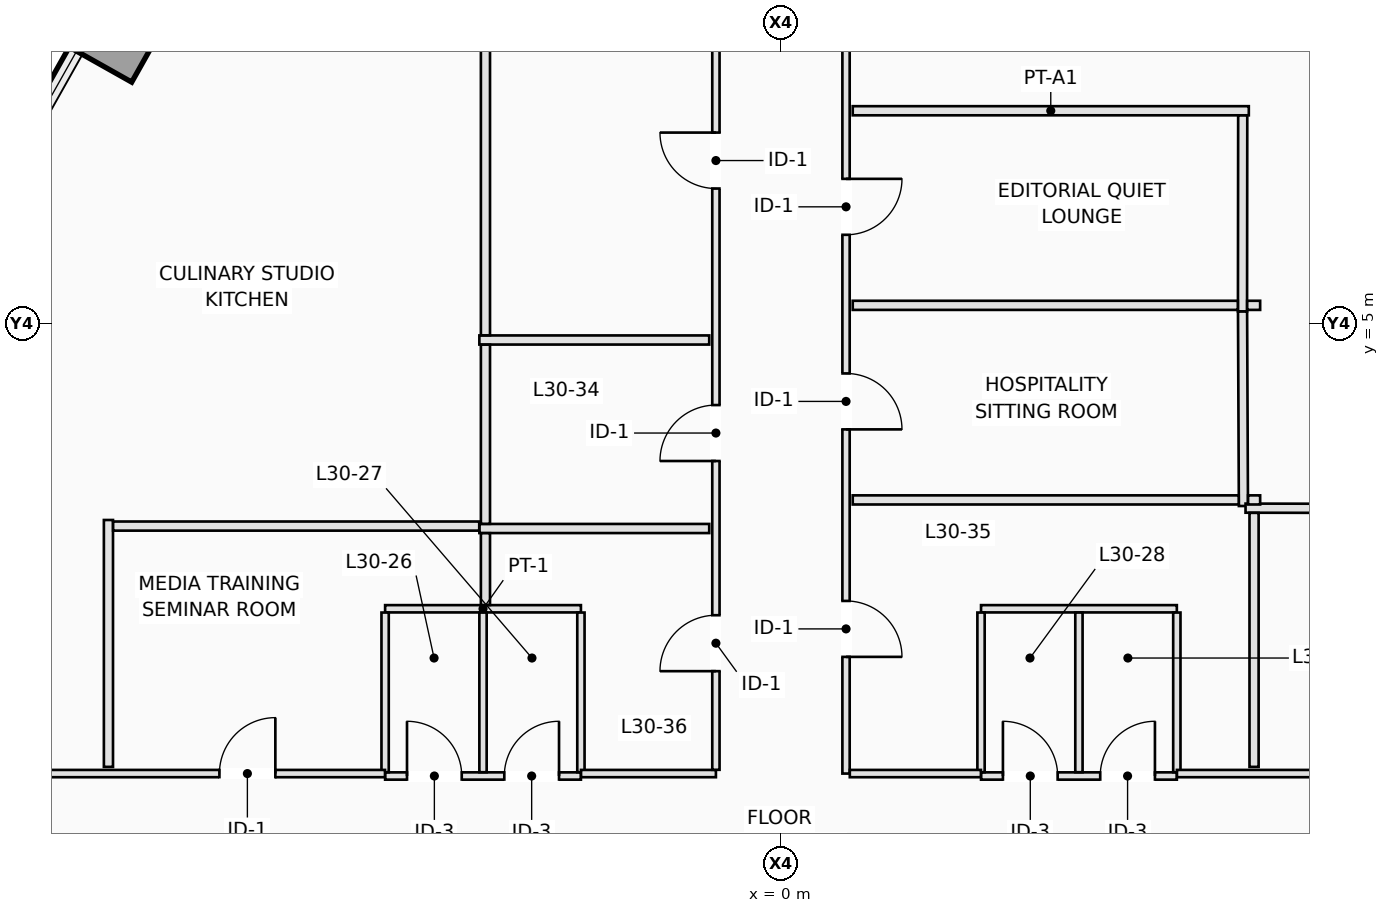
"""IFC4 building model, lengths in metres.
Left out: names, types, materials, properties, quantities, classifications, styles, units other than length and angle.
Written with IfcOpenShell. Run it as: python <this file> out.ifc"""

import sys

from ifc_helpers import new_model, si_unit, direction, frame, frame_2d, origin, origin_2d, place, context, subcontext, project, spatial, rectangle, extrude, element, fill, save


model = new_model("IFC4")
c1 = context("Model", 3, precision=1e-05, world=origin(), true_north=direction((0.0, 1.0)))
c2 = subcontext(c1, "Body", "Model", "MODEL_VIEW")
j1 = project(units=[si_unit("LENGTHUNIT", "METRE"), si_unit("PLANEANGLEUNIT", "RADIAN")], contexts=[c1])
p1 = place(None, origin())
s1 = spatial("IfcSite", under=j1, at=p1, CompositionType="ELEMENT")
p2 = place(p1, origin())
s2 = spatial("IfcBuilding", under=s1, at=p2, CompositionType="ELEMENT")
p3 = place(p2, frame((0.0, 0.0, 112.5)))
s3 = spatial("IfcBuildingStorey", under=s2, at=p3, CompositionType="ELEMENT", Elevation=112.5)
p4 = place(p3, frame((-10.887, 9.72, 0.0), z_axis=(0.0, 0.0, 1.0), x_axis=(-0.871575139605, 0.490261946333, 0.0)))
e1 = element("IfcColumn", 1, at=p4, inside=s3, PredefinedType="COLUMN", context=c2, shape_type="SweptSolid", body=[
    extrude(rectangle(XDim=1.1, YDim=1.1, at=origin_2d()), origin(), (0.0, 0.0, 1.0), 3.5),
])
p5 = place(p3, frame((-6.51, -2.44, 0.0), z_axis=(0.0, 0.0, 1.0), x_axis=(1.0, 0.0, 0.0)))
e2 = element("IfcWall", 2, at=p5, inside=s3, PredefinedType="PARTITIONING", context=c2, shape_type="SweptSolid", body=[
    extrude(rectangle(XDim=3.22, YDim=0.12, at=frame_2d((1.61, 0.0))), origin(), (0.0, 0.0, 1.0), 3.25),
])
p6 = place(p5, frame((0.36, 0.0, 0.0)))
e3 = element("IfcOpeningElement", 3, at=p6, cuts=e2, PredefinedType="OPENING", context=c2, shape_type="SweptSolid", body=[
    extrude(rectangle(XDim=0.9, YDim=2.12, at=frame_2d((0.45, 1.06))), frame((0.0, 0.07, 0.0), z_axis=(0.0, -1.0, 0.0), x_axis=(1.0, 0.0, 0.0)), (0.0, 0.0, 1.0), 0.14),
])
p7 = place(p5, frame((1.96, 0.0, 0.0)))
e4 = element("IfcOpeningElement", 4, at=p7, cuts=e2, PredefinedType="OPENING", context=c2, shape_type="SweptSolid", body=[
    extrude(rectangle(XDim=0.9, YDim=2.12, at=frame_2d((0.45, 1.06))), frame((0.0, 0.07, 0.0), z_axis=(0.0, -1.0, 0.0), x_axis=(1.0, 0.0, 0.0)), (0.0, 0.0, 1.0), 0.14),
])
p8 = place(p3, frame((-6.51, 0.31, 0.0), z_axis=(0.0, 0.0, 1.0), x_axis=(1.0, 0.0, 0.0)))
e5 = element("IfcWall", 5, at=p8, inside=s3, PredefinedType="PARTITIONING", context=c2, shape_type="SweptSolid", body=[
    extrude(rectangle(XDim=3.22, YDim=0.12, at=frame_2d((1.61, 0.0))), origin(), (0.0, 0.0, 1.0), 2.891),
])
for number, where, z_axis, x_axis in (
    (6, (-6.51, -2.378, 0.0), (0.0, 0.0, 1.0), (0.0, 1.0, 0.0)),
    (7, (-4.9, -2.378, 0.0), (0.0, 0.0, 1.0), (0.0, 1.0, 0.0)),
    (8, (-3.29, -2.378, 0.0), (0.0, 0.0, 1.0), (0.0, 1.0, 0.0)),
):
    element("IfcWall", number, at=place(p3, frame(where, z_axis=z_axis, x_axis=x_axis)), inside=s3, PredefinedType="PARTITIONING", context=c2, shape_type="SweptSolid", body=[
        extrude(rectangle(XDim=2.626, YDim=0.12, at=frame_2d((1.313, 0.0))), origin(), (0.0, 0.0, 1.0), 3.25),
    ])
p9 = place(p3, frame((3.29, -2.44, 0.0), z_axis=(0.0, 0.0, 1.0), x_axis=(1.0, 0.0, 0.0)))
e9 = element("IfcWall", 9, at=p9, inside=s3, PredefinedType="PARTITIONING", context=c2, shape_type="SweptSolid", body=[
    extrude(rectangle(XDim=3.22, YDim=0.12, at=frame_2d((1.61, 0.0))), origin(), (0.0, 0.0, 1.0), 3.25),
])
p10 = place(p9, frame((0.36, 0.0, 0.0)))
e10 = element("IfcOpeningElement", 10, at=p10, cuts=e9, PredefinedType="OPENING", context=c2, shape_type="SweptSolid", body=[
    extrude(rectangle(XDim=0.9, YDim=2.12, at=frame_2d((0.45, 1.06))), frame((0.0, 0.07, 0.0), z_axis=(0.0, -1.0, 0.0), x_axis=(1.0, 0.0, 0.0)), (0.0, 0.0, 1.0), 0.14),
])
p11 = place(p9, frame((1.96, 0.0, 0.0)))
e11 = element("IfcOpeningElement", 11, at=p11, cuts=e9, PredefinedType="OPENING", context=c2, shape_type="SweptSolid", body=[
    extrude(rectangle(XDim=0.9, YDim=2.12, at=frame_2d((0.45, 1.06))), frame((0.0, 0.07, 0.0), z_axis=(0.0, -1.0, 0.0), x_axis=(1.0, 0.0, 0.0)), (0.0, 0.0, 1.0), 0.14),
])
p12 = place(p3, frame((3.29, 0.31, 0.0), z_axis=(0.0, 0.0, 1.0), x_axis=(1.0, 0.0, 0.0)))
e12 = element("IfcWall", 12, at=p12, inside=s3, PredefinedType="PARTITIONING", context=c2, shape_type="SweptSolid", body=[
    extrude(rectangle(XDim=3.22, YDim=0.12, at=frame_2d((1.61, 0.0))), origin(), (0.0, 0.0, 1.0), 2.891),
])
for number, where, z_axis, x_axis in (
    (13, (3.29, -2.378, 0.0), (0.0, 0.0, 1.0), (0.0, 1.0, 0.0)),
    (14, (4.9, -2.378, 0.0), (0.0, 0.0, 1.0), (0.0, 1.0, 0.0)),
    (15, (6.51, -2.378, 0.0), (0.0, 0.0, 1.0), (0.0, 1.0, 0.0)),
):
    element("IfcWall", number, at=place(p3, frame(where, z_axis=z_axis, x_axis=x_axis)), inside=s3, PredefinedType="PARTITIONING", context=c2, shape_type="SweptSolid", body=[
        extrude(rectangle(XDim=2.626, YDim=0.12, at=frame_2d((1.313, 0.0))), origin(), (0.0, 0.0, 1.0), 3.25),
    ])
p13 = place(p3, frame((-12.348, -2.4, 0.0), z_axis=(0.0, 0.0, 1.0), x_axis=(1.0, 0.0, 0.0)))
e16 = element("IfcWall", 16, at=p13, inside=s3, PredefinedType="PARTITIONING", context=c2, shape_type="SweptSolid", body=[
    extrude(rectangle(XDim=5.836, YDim=0.12, at=frame_2d((2.918, 0.0))), origin(), (0.0, 0.0, 1.0), 3.25),
])
p14 = place(p13, frame((3.113, 0.0, 0.0)))
e17 = element("IfcOpeningElement", 17, at=p14, cuts=e16, PredefinedType="OPENING", context=c2, shape_type="SweptSolid", body=[
    extrude(rectangle(XDim=0.92, YDim=2.12, at=frame_2d((0.46, 1.06))), frame((0.0, 0.07, 0.0), z_axis=(0.0, -1.0, 0.0), x_axis=(1.0, 0.0, 0.0)), (0.0, 0.0, 1.0), 0.14),
])
p15 = place(p3, frame((-3.288, -2.4, 0.0), z_axis=(0.0, 0.0, 1.0), x_axis=(1.0, 0.0, 0.0)))
e18 = element("IfcWall", 18, at=p15, inside=s3, PredefinedType="PARTITIONING", context=c2, shape_type="SweptSolid", body=[
    extrude(rectangle(XDim=2.218, YDim=0.12, at=frame_2d((1.109, 0.0))), origin(), (0.0, 0.0, 1.0), 3.25),
])
p16 = place(p3, frame((-1.07, -2.338, 0.0), z_axis=(0.0, 0.0, 1.0), x_axis=(0.0, 1.0, 0.0)))
e19 = element("IfcWall", 19, at=p16, inside=s3, PredefinedType="PARTITIONING", context=c2, shape_type="SweptSolid", body=[
    extrude(rectangle(XDim=13.188, YDim=0.12, at=frame_2d((6.594, 0.0))), origin(), (0.0, 0.0, 1.0), 3.25),
])
p17 = place(p16, frame((9.559, 0.0, 0.0)))
e20 = element("IfcOpeningElement", 20, at=p17, cuts=e19, PredefinedType="OPENING", context=c2, shape_type="SweptSolid", body=[
    extrude(rectangle(XDim=0.92, YDim=2.12, at=frame_2d((0.46, 1.06))), frame((0.0, 0.07, 0.0), z_axis=(0.0, -1.0, 0.0), x_axis=(1.0, 0.0, 0.0)), (0.0, 0.0, 1.0), 0.14),
])
p18 = place(p16, frame((5.078, 0.0, 0.0)))
e21 = element("IfcOpeningElement", 21, at=p18, cuts=e19, PredefinedType="OPENING", context=c2, shape_type="SweptSolid", body=[
    extrude(rectangle(XDim=0.92, YDim=2.12, at=frame_2d((0.46, 1.06))), frame((0.0, 0.07, 0.0), z_axis=(0.0, -1.0, 0.0), x_axis=(1.0, 0.0, 0.0)), (0.0, 0.0, 1.0), 0.14),
])
p19 = place(p16, frame((1.622, 0.0, 0.0)))
e22 = element("IfcOpeningElement", 22, at=p19, cuts=e19, PredefinedType="OPENING", context=c2, shape_type="SweptSolid", body=[
    extrude(rectangle(XDim=0.92, YDim=2.12, at=frame_2d((0.46, 1.06))), frame((0.0, 0.07, 0.0), z_axis=(0.0, -1.0, 0.0), x_axis=(1.0, 0.0, 0.0)), (0.0, 0.0, 1.0), 0.14),
])
p20 = place(p3, frame((1.07, 10.788, 0.0), z_axis=(0.0, 0.0, 1.0), x_axis=(0.0, -1.0, 0.0)))
e23 = element("IfcWall", 23, at=p20, inside=s3, PredefinedType="PARTITIONING", context=c2, shape_type="SweptSolid", body=[
    extrude(rectangle(XDim=13.188, YDim=0.12, at=frame_2d((6.594, 0.0))), origin(), (0.0, 0.0, 1.0), 3.25),
])
p21 = place(p20, frame((3.408, 0.0, 0.0)))
e24 = element("IfcOpeningElement", 24, at=p21, cuts=e23, PredefinedType="OPENING", context=c2, shape_type="SweptSolid", body=[
    extrude(rectangle(XDim=0.92, YDim=2.12, at=frame_2d((0.46, 1.06))), frame((0.0, 0.07, 0.0), z_axis=(0.0, -1.0, 0.0), x_axis=(1.0, 0.0, 0.0)), (0.0, 0.0, 1.0), 0.14),
])
p22 = place(p20, frame((6.608, 0.0, 0.0)))
e25 = element("IfcOpeningElement", 25, at=p22, cuts=e23, PredefinedType="OPENING", context=c2, shape_type="SweptSolid", body=[
    extrude(rectangle(XDim=0.92, YDim=2.12, at=frame_2d((0.46, 1.06))), frame((0.0, 0.07, 0.0), z_axis=(0.0, -1.0, 0.0), x_axis=(1.0, 0.0, 0.0)), (0.0, 0.0, 1.0), 0.14),
])
p23 = place(p20, frame((10.349, 0.0, 0.0)))
e26 = element("IfcOpeningElement", 26, at=p23, cuts=e23, PredefinedType="OPENING", context=c2, shape_type="SweptSolid", body=[
    extrude(rectangle(XDim=0.92, YDim=2.12, at=frame_2d((0.46, 1.06))), frame((0.0, 0.07, 0.0), z_axis=(0.0, -1.0, 0.0), x_axis=(1.0, 0.0, 0.0)), (0.0, 0.0, 1.0), 0.14),
])
p24 = place(p3, frame((1.132, -2.4, 0.0), z_axis=(0.0, 0.0, 1.0), x_axis=(1.0, 0.0, 0.0)))
e27 = element("IfcWall", 27, at=p24, inside=s3, PredefinedType="PARTITIONING", context=c2, shape_type="SweptSolid", body=[
    extrude(rectangle(XDim=2.156, YDim=0.12, at=frame_2d((1.078, 0.0))), origin(), (0.0, 0.0, 1.0), 3.25),
])
p25 = place(p3, frame((6.512, -2.4, 0.0), z_axis=(0.0, 0.0, 1.0), x_axis=(1.0, 0.0, 0.0)))
e28 = element("IfcWall", 28, at=p25, inside=s3, PredefinedType="PARTITIONING", context=c2, shape_type="SweptSolid", body=[
    extrude(rectangle(XDim=5.898, YDim=0.12, at=frame_2d((2.949, 0.0))), origin(), (0.0, 0.0, 1.0), 3.25),
])
p26 = place(p25, frame((2.994, 0.0, 0.0)))
e29 = element("IfcOpeningElement", 29, at=p26, cuts=e28, PredefinedType="OPENING", context=c2, shape_type="SweptSolid", body=[
    extrude(rectangle(XDim=0.92, YDim=2.12, at=frame_2d((0.46, 1.06))), frame((0.0, 0.07, 0.0), z_axis=(0.0, -1.0, 0.0), x_axis=(1.0, 0.0, 0.0)), (0.0, 0.0, 1.0), 0.14),
])
p27 = place(p3, frame((7.694, 8.5, 0.0), z_axis=(0.0, 0.0, 1.0), x_axis=(-1.0, 0.0, 0.0)))
e30 = element("IfcWall", 30, at=p27, inside=s3, PredefinedType="PARTITIONING", context=c2, shape_type="SweptSolid", body=[
    extrude(rectangle(XDim=6.514, YDim=0.15, at=frame_2d((3.257, 0.0))), origin(), (0.0, 0.0, 1.0), 3.25),
])
p28 = place(p3, frame((7.59, 5.2, 0.0), z_axis=(0.0, 0.0, 1.0), x_axis=(0.001136190753, 0.999999354535, 0.0)))
e31 = element("IfcWall", 31, at=p28, inside=s3, PredefinedType="PARTITIONING", context=c2, shape_type="SweptSolid", body=[
    extrude(rectangle(XDim=3.223, YDim=0.15, at=frame_2d((1.612, 0.0))), origin(), (0.0, 0.0, 1.0), 3.25),
])
p29 = place(p3, frame((7.605, 2.0, 0.0), z_axis=(0.0, 0.0, 1.0), x_axis=(-0.004427775513, 0.999990197354, 0.0)))
e32 = element("IfcWall", 32, at=p29, inside=s3, PredefinedType="PARTITIONING", context=c2, shape_type="SweptSolid", body=[
    extrude(rectangle(XDim=3.198, YDim=0.15, at=frame_2d((1.599, 0.0))), origin(), (0.0, 0.0, 1.0), 3.25),
])
p30 = place(p3, frame((-1.18, 4.73, 0.0), z_axis=(0.0, 0.0, 1.0), x_axis=(-1.0, 0.0, 0.0)))
e33 = element("IfcWall", 33, at=p30, inside=s3, PredefinedType="PARTITIONING", context=c2, shape_type="SweptSolid", body=[
    extrude(rectangle(XDim=3.78, YDim=0.15, at=frame_2d((1.89, 0.0))), origin(), (0.0, 0.0, 1.0), 3.25),
])
p31 = place(p3, frame((-4.86, 4.807, 0.0), z_axis=(0.0, 0.0, 1.0), x_axis=(0.0, 1.0, 0.0)))
e34 = element("IfcWall", 34, at=p31, inside=s3, PredefinedType="PARTITIONING", context=c2, shape_type="SweptSolid", body=[
    extrude(rectangle(XDim=14.501, YDim=0.15, at=frame_2d((7.251, 0.0))), origin(), (0.0, 0.0, 1.0), 2.648),
])
p32 = place(p3, frame((15.808, 1.949, 0.0), z_axis=(0.0, 0.0, 1.0), x_axis=(-0.999998283071, 0.001853066338, 0.0)))
e35 = element("IfcWall", 35, at=p32, inside=s3, PredefinedType="PARTITIONING", context=c2, shape_type="SweptSolid", body=[
    extrude(rectangle(XDim=8.168, YDim=0.15, at=frame_2d((4.084, 0.0))), origin(), (0.0, 0.0, 1.0), 3.25),
])
p33 = place(p3, frame((7.88, 5.3, 0.0), z_axis=(0.0, 0.0, 1.0), x_axis=(-1.0, 0.0, 0.0)))
e36 = element("IfcWall", 36, at=p33, inside=s3, PredefinedType="PARTITIONING", context=c2, shape_type="SweptSolid", body=[
    extrude(rectangle(XDim=0.213, YDim=0.15, at=frame_2d((0.106, 0.0))), origin(), (0.0, 0.0, 1.0), 3.25),
])
p34 = place(p3, frame((7.513, 5.3, 0.0), z_axis=(0.0, 0.0, 1.0), x_axis=(-1.0, 0.0, 0.0)))
e37 = element("IfcWall", 37, at=p34, inside=s3, PredefinedType="PARTITIONING", context=c2, shape_type="SweptSolid", body=[
    extrude(rectangle(XDim=6.333, YDim=0.15, at=frame_2d((3.167, 0.0))), origin(), (0.0, 0.0, 1.0), 3.25),
])
p35 = place(p3, frame((7.88, 2.1, 0.0), z_axis=(0.0, 0.0, 1.0), x_axis=(-1.0, 0.0, 0.0)))
e38 = element("IfcWall", 38, at=p35, inside=s3, PredefinedType="PARTITIONING", context=c2, shape_type="SweptSolid", body=[
    extrude(rectangle(XDim=0.198, YDim=0.15, at=frame_2d((0.099, 0.0))), origin(), (0.0, 0.0, 1.0), 3.25),
])
p36 = place(p3, frame((7.528, 2.1, 0.0), z_axis=(0.0, 0.0, 1.0), x_axis=(-1.0, 0.0, 0.0)))
e39 = element("IfcWall", 39, at=p36, inside=s3, PredefinedType="PARTITIONING", context=c2, shape_type="SweptSolid", body=[
    extrude(rectangle(XDim=6.348, YDim=0.15, at=frame_2d((3.174, 0.0))), origin(), (0.0, 0.0, 1.0), 3.25),
])
p37 = place(p3, frame((-1.18, 1.63, 0.0), z_axis=(0.0, 0.0, 1.0), x_axis=(-1.0, 0.0, 0.0)))
e40 = element("IfcWall", 40, at=p37, inside=s3, PredefinedType="PARTITIONING", context=c2, shape_type="SweptSolid", body=[
    extrude(rectangle(XDim=3.78, YDim=0.15, at=frame_2d((1.89, 0.0))), origin(), (0.0, 0.0, 1.0), 3.25),
])
p38 = place(p3, frame((-4.86, 0.372, 0.0), z_axis=(0.0, 0.0, 1.0), x_axis=(0.0, 1.0, 0.0)))
e41 = element("IfcWall", 41, at=p38, inside=s3, PredefinedType="PARTITIONING", context=c2, shape_type="SweptSolid", body=[
    extrude(rectangle(XDim=1.181, YDim=0.15, at=frame_2d((0.59, 0.0))), origin(), (0.0, 0.0, 1.0), 3.25),
])
p39 = place(p3, frame((-4.86, 1.707, 0.0), z_axis=(0.0, 0.0, 1.0), x_axis=(0.0, 1.0, 0.0)))
e42 = element("IfcWall", 42, at=p39, inside=s3, PredefinedType="PARTITIONING", context=c2, shape_type="SweptSolid", body=[
    extrude(rectangle(XDim=2.946, YDim=0.15, at=frame_2d((1.473, 0.0))), origin(), (0.0, 0.0, 1.0), 3.25),
])
p40 = place(p3, frame((7.78, 1.887, 0.0), z_axis=(0.0, 0.0, 1.0), x_axis=(0.0, -1.0, 0.0)))
e43 = element("IfcWall", 43, at=p40, inside=s3, PredefinedType="PARTITIONING", context=c2, shape_type="SweptSolid", body=[
    extrude(rectangle(XDim=4.177, YDim=0.15, at=frame_2d((2.089, 0.0))), origin(), (0.0, 0.0, 1.0), 3.25),
])
p41 = place(p3, frame((-11.06, -2.29, 0.0), z_axis=(0.0, 0.0, 1.0), x_axis=(0.0, 1.0, 0.0)))
e44 = element("IfcWall", 44, at=p41, inside=s3, PredefinedType="PARTITIONING", context=c2, shape_type="SweptSolid", body=[
    extrude(rectangle(XDim=4.06, YDim=0.15, at=frame_2d((2.03, 0.0))), origin(), (0.0, 0.0, 1.0), 3.25),
])
p42 = place(p3, frame((-10.983, 1.67, 0.0), z_axis=(0.0, 0.0, 1.0), x_axis=(1.0, 0.0, 0.0)))
e45 = element("IfcWall", 45, at=p42, inside=s3, PredefinedType="PARTITIONING", context=c2, shape_type="SweptSolid", body=[
    extrude(rectangle(XDim=6.021, YDim=0.15, at=frame_2d((3.01, 0.0))), origin(), (0.0, 0.0, 1.0), 3.25),
])
p43 = place(p6, origin())
e46 = element("IfcDoor", 46, at=p43, inside=s3, OperationType="SINGLE_SWING_LEFT", PredefinedType="DOOR", context=c2, shape_type="SweptSolid", body=[
    extrude(rectangle(XDim=0.9, YDim=2.12, at=frame_2d((0.45, 1.06))), frame((0.0, 0.025, 0.0), z_axis=(0.0, -1.0, 0.0), x_axis=(1.0, 0.0, 0.0)), (0.0, 0.0, 1.0), 0.05),
])
fill(e3, e46)
p44 = place(p7, origin())
e47 = element("IfcDoor", 47, at=p44, inside=s3, OperationType="SINGLE_SWING_RIGHT", PredefinedType="DOOR", context=c2, shape_type="SweptSolid", body=[
    extrude(rectangle(XDim=0.9, YDim=2.12, at=frame_2d((0.45, 1.06))), frame((0.0, 0.025, 0.0), z_axis=(0.0, -1.0, 0.0), x_axis=(1.0, 0.0, 0.0)), (0.0, 0.0, 1.0), 0.05),
])
fill(e4, e47)
p45 = place(p10, origin())
e48 = element("IfcDoor", 48, at=p45, inside=s3, OperationType="SINGLE_SWING_LEFT", PredefinedType="DOOR", context=c2, shape_type="SweptSolid", body=[
    extrude(rectangle(XDim=0.9, YDim=2.12, at=frame_2d((0.45, 1.06))), frame((0.0, 0.025, 0.0), z_axis=(0.0, -1.0, 0.0), x_axis=(1.0, 0.0, 0.0)), (0.0, 0.0, 1.0), 0.05),
])
fill(e10, e48)
p46 = place(p11, origin())
e49 = element("IfcDoor", 49, at=p46, inside=s3, OperationType="SINGLE_SWING_RIGHT", PredefinedType="DOOR", context=c2, shape_type="SweptSolid", body=[
    extrude(rectangle(XDim=0.9, YDim=2.12, at=frame_2d((0.45, 1.06))), frame((0.0, 0.025, 0.0), z_axis=(0.0, -1.0, 0.0), x_axis=(1.0, 0.0, 0.0)), (0.0, 0.0, 1.0), 0.05),
])
fill(e11, e49)
p47 = place(p17, origin())
e50 = element("IfcDoor", 50, at=p47, inside=s3, OperationType="SINGLE_SWING_RIGHT", PredefinedType="DOOR", context=c2, shape_type="SweptSolid", body=[
    extrude(rectangle(XDim=0.92, YDim=2.12, at=frame_2d((0.46, 1.06))), frame((0.0, 0.025, 0.0), z_axis=(0.0, -1.0, 0.0), x_axis=(1.0, 0.0, 0.0)), (0.0, 0.0, 1.0), 0.05),
])
fill(e20, e50)
p48 = place(p21, origin())
e51 = element("IfcDoor", 51, at=p48, inside=s3, OperationType="SINGLE_SWING_LEFT", PredefinedType="DOOR", context=c2, shape_type="SweptSolid", body=[
    extrude(rectangle(XDim=0.92, YDim=2.12, at=frame_2d((0.46, 1.06))), frame((0.0, 0.025, 0.0), z_axis=(0.0, -1.0, 0.0), x_axis=(1.0, 0.0, 0.0)), (0.0, 0.0, 1.0), 0.05),
])
fill(e24, e51)
p49 = place(p22, origin())
e52 = element("IfcDoor", 52, at=p49, inside=s3, OperationType="SINGLE_SWING_RIGHT", PredefinedType="DOOR", context=c2, shape_type="SweptSolid", body=[
    extrude(rectangle(XDim=0.92, YDim=2.12, at=frame_2d((0.46, 1.06))), frame((0.0, 0.025, 0.0), z_axis=(0.0, -1.0, 0.0), x_axis=(1.0, 0.0, 0.0)), (0.0, 0.0, 1.0), 0.05),
])
fill(e25, e52)
p50 = place(p18, origin())
e53 = element("IfcDoor", 53, at=p50, inside=s3, OperationType="SINGLE_SWING_LEFT", PredefinedType="DOOR", context=c2, shape_type="SweptSolid", body=[
    extrude(rectangle(XDim=0.92, YDim=2.12, at=frame_2d((0.46, 1.06))), frame((0.0, 0.025, 0.0), z_axis=(0.0, -1.0, 0.0), x_axis=(1.0, 0.0, 0.0)), (0.0, 0.0, 1.0), 0.05),
])
fill(e21, e53)
p51 = place(p23, origin())
e54 = element("IfcDoor", 54, at=p51, inside=s3, OperationType="SINGLE_SWING_RIGHT", PredefinedType="DOOR", context=c2, shape_type="SweptSolid", body=[
    extrude(rectangle(XDim=0.92, YDim=2.12, at=frame_2d((0.46, 1.06))), frame((0.0, 0.025, 0.0), z_axis=(0.0, -1.0, 0.0), x_axis=(1.0, 0.0, 0.0)), (0.0, 0.0, 1.0), 0.05),
])
fill(e26, e54)
p52 = place(p19, origin())
e55 = element("IfcDoor", 55, at=p52, inside=s3, OperationType="SINGLE_SWING_LEFT", PredefinedType="DOOR", context=c2, shape_type="SweptSolid", body=[
    extrude(rectangle(XDim=0.92, YDim=2.12, at=frame_2d((0.46, 1.06))), frame((0.0, 0.025, 0.0), z_axis=(0.0, -1.0, 0.0), x_axis=(1.0, 0.0, 0.0)), (0.0, 0.0, 1.0), 0.05),
])
fill(e22, e55)
p53 = place(p14, origin())
e56 = element("IfcDoor", 56, at=p53, inside=s3, OperationType="SINGLE_SWING_RIGHT", PredefinedType="DOOR", context=c2, shape_type="SweptSolid", body=[
    extrude(rectangle(XDim=0.92, YDim=2.12, at=frame_2d((0.46, 1.06))), frame((0.0, 0.025, 0.0), z_axis=(0.0, -1.0, 0.0), x_axis=(1.0, 0.0, 0.0)), (0.0, 0.0, 1.0), 0.05),
])
fill(e17, e56)
save(model, sys.argv[1])
